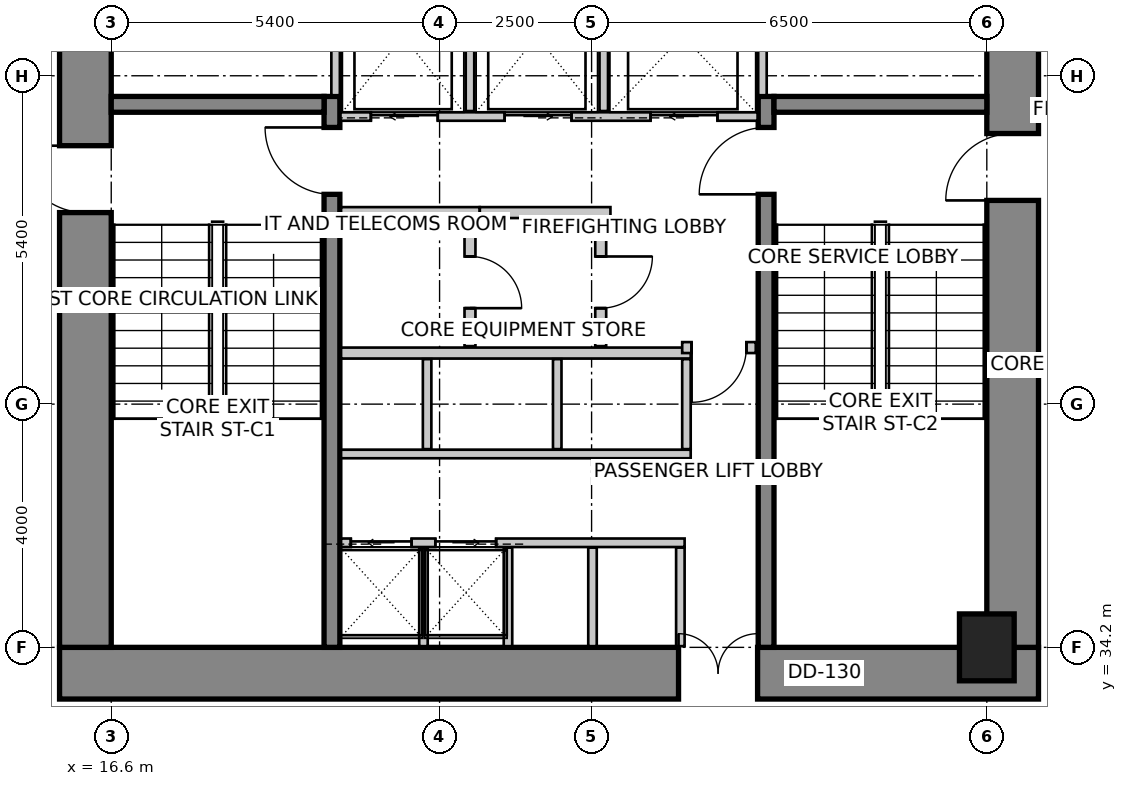
"""IFC4 building model, lengths in metres.
Left out: names, types, materials, properties, quantities, classifications, styles, units other than length and angle.
Written with IfcOpenShell. Run it as: python <this file> out.ifc"""

import sys

from ifc_helpers import new_model, si_unit, direction, frame, frame_2d, origin, origin_2d, place, context, subcontext, project, spatial, rectangle, extrude, source, transform, mapped, element, fill, save


model = new_model("IFC4")
c1 = context("Model", 3, precision=1e-05, world=origin(), true_north=direction((0.0, 1.0)))
c2 = subcontext(c1, "Body", "Model", "MODEL_VIEW")
j1 = project(units=[si_unit("LENGTHUNIT", "METRE"), si_unit("PLANEANGLEUNIT", "RADIAN")], contexts=[c1])
p1 = place(None, origin())
s1 = spatial("IfcSite", under=j1, at=p1, CompositionType="ELEMENT")
p2 = place(p1, origin())
s2 = spatial("IfcBuilding", under=s1, at=p2, CompositionType="ELEMENT")
p3 = place(p2, frame((0.0, 0.0, 71.0)))
s3 = spatial("IfcBuildingStorey", under=s2, at=p3, CompositionType="ELEMENT", Elevation=71.0)
p4 = place(p3, frame((15.75, 33.775, 0.0), z_axis=(0.0, 0.0, 1.0), x_axis=(1.0, 0.0, 0.0)))
e1 = element("IfcWall", 1, at=p4, inside=s3, PredefinedType="SHEAR", context=c2, shape_type="SweptSolid", body=[
    extrude(rectangle(XDim=16.1, YDim=0.85, at=frame_2d((8.05, 0.0))), origin(), (0.0, 0.0, 1.0), 4.0),
])
m1 = source(origin(), c2, "Body", "SweptSolid", [
    extrude(rectangle(XDim=1.3, YDim=2.15, at=frame_2d((0.65, 1.075))), frame((0.0, 0.435, 0.0), z_axis=(0.0, -1.0, 0.0), x_axis=(1.0, 0.0, 0.0)), (0.0, 0.0, 1.0), 0.87),
])
p5 = place(p4, frame((10.18, 0.0, 0.0)))
e2 = element("IfcOpeningElement", 2, at=p5, cuts=e1, PredefinedType="OPENING", context=c2, shape_type="MappedRepresentation", body=[
    mapped(m1, transform((0.0, 0.0, 0.0), scale=1.0)),
])
p6 = place(p3, frame((16.175, 34.2, 0.0), z_axis=(0.0, 0.0, 1.0), x_axis=(0.0, 1.0, 0.0)))
e3 = element("IfcWall", 3, at=p6, inside=s3, PredefinedType="SHEAR", context=c2, shape_type="SweptSolid", body=[
    extrude(rectangle(XDim=11.4, YDim=0.85, at=frame_2d((5.7, 0.0))), origin(), (0.0, 0.0, 1.0), 4.0),
])
m2 = source(origin(), c2, "Body", "SweptSolid", [
    extrude(rectangle(XDim=1.1, YDim=2.15, at=frame_2d((0.55, 1.075))), frame((0.0, 0.435, 0.0), z_axis=(0.0, -1.0, 0.0), x_axis=(1.0, 0.0, 0.0)), (0.0, 0.0, 1.0), 0.87),
])
p7 = place(p6, frame((7.15, 0.0, 0.0)))
e4 = element("IfcOpeningElement", 4, at=p7, cuts=e3, PredefinedType="OPENING", context=c2, shape_type="MappedRepresentation", body=[
    mapped(m2, transform((0.0, 0.0, 0.0), scale=1.0)),
])
p8 = place(p3, frame((31.425, 34.2, 0.0), z_axis=(0.0, 0.0, 1.0), x_axis=(0.0, 1.0, 0.0)))
e5 = element("IfcWall", 5, at=p8, inside=s3, PredefinedType="SHEAR", context=c2, shape_type="SweptSolid", body=[
    extrude(rectangle(XDim=11.4, YDim=0.85, at=frame_2d((5.7, 0.0))), origin(), (0.0, 0.0, 1.0), 4.0),
])
p9 = place(p8, frame((7.35, 0.0, 0.0)))
e6 = element("IfcOpeningElement", 6, at=p9, cuts=e5, PredefinedType="OPENING", context=c2, shape_type="MappedRepresentation", body=[
    mapped(m2, transform((0.0, 0.0, 0.0), scale=1.0)),
])
p10 = place(p3, frame((20.23, 34.2, 0.0), z_axis=(0.0, 0.0, 1.0), x_axis=(0.0, 1.0, 0.0)))
e7 = element("IfcWall", 7, at=p10, inside=s3, PredefinedType="SHEAR", context=c2, shape_type="SweptSolid", body=[
    extrude(rectangle(XDim=9.06, YDim=0.26, at=frame_2d((4.53, 0.0))), origin(), (0.0, 0.0, 1.0), 4.0),
])
m3 = source(origin(), c2, "Body", "SweptSolid", [
    extrude(rectangle(XDim=1.1, YDim=2.15, at=frame_2d((0.55, 1.075))), frame((0.0, 0.14, 0.0), z_axis=(0.0, -1.0, 0.0), x_axis=(1.0, 0.0, 0.0)), (0.0, 0.0, 1.0), 0.28),
])
p11 = place(p10, frame((7.45, 0.0, 0.0)))
e8 = element("IfcOpeningElement", 8, at=p11, cuts=e7, PredefinedType="OPENING", context=c2, shape_type="MappedRepresentation", body=[
    mapped(m3, transform((0.0, 0.0, 0.0), scale=1.0)),
])
p12 = place(p3, frame((27.37, 34.2, 0.0), z_axis=(0.0, 0.0, 1.0), x_axis=(0.0, 1.0, 0.0)))
e9 = element("IfcWall", 9, at=p12, inside=s3, PredefinedType="SHEAR", context=c2, shape_type="SweptSolid", body=[
    extrude(rectangle(XDim=9.06, YDim=0.26, at=frame_2d((4.53, 0.0))), origin(), (0.0, 0.0, 1.0), 4.0),
])
p13 = place(p12, frame((7.45, 0.0, 0.0)))
e10 = element("IfcOpeningElement", 10, at=p13, cuts=e9, PredefinedType="OPENING", context=c2, shape_type="MappedRepresentation", body=[
    mapped(m3, transform((0.0, 0.0, 0.0), scale=1.0)),
])
for number, where, z_axis, x_axis in (
    (11, (16.6, 43.13, 0.0), (0.0, 0.0, 1.0), (1.0, 0.0, 0.0)),
    (12, (27.5, 43.13, 0.0), (0.0, 0.0, 1.0), (1.0, 0.0, 0.0)),
):
    element("IfcWall", number, at=place(p3, frame(where, z_axis=z_axis, x_axis=x_axis)), inside=s3, PredefinedType="SHEAR", context=c2, shape_type="SweptSolid", body=[
        extrude(rectangle(XDim=3.5, YDim=0.26, at=frame_2d((1.75, 0.0))), origin(), (0.0, 0.0, 1.0), 4.0),
    ])
m4 = source(origin(), c2, "Body", "SweptSolid", [
    extrude(rectangle(XDim=0.9, YDim=1.1, at=origin_2d()), origin(), (0.0, 0.0, 1.0), 4.0),
])
p14 = place(p3, frame((31.0, 34.2, 0.0), z_axis=(0.0, 0.0, 1.0), x_axis=(1.0, 0.0, 0.0)))
e13 = element("IfcColumn", 13, at=p14, inside=s3, PredefinedType="COLUMN", context=c2, shape_type="MappedRepresentation", body=[
    mapped(m4, transform((0.0, 0.0, 0.0), scale=1.0)),
])
p15 = place(p3, frame((20.37, 42.93, 0.0), z_axis=(0.0, 0.0, 1.0), x_axis=(1.0, 0.0, 0.0)))
e14 = element("IfcWall", 14, at=p15, inside=s3, PredefinedType="SOLIDWALL", context=c2, shape_type="SweptSolid", body=[
    extrude(rectangle(XDim=6.86, YDim=0.14, at=frame_2d((3.43, 0.0))), origin(), (0.0, 0.0, 1.0), 3.75),
])
m5 = source(origin(), c2, "Body", "SweptSolid", [
    extrude(rectangle(XDim=1.1, YDim=2.15, at=frame_2d((0.55, 1.075))), frame((0.0, 0.08, 0.0), z_axis=(0.0, -1.0, 0.0), x_axis=(1.0, 0.0, 0.0)), (0.0, 0.0, 1.0), 0.16),
])
p16 = place(p15, frame((0.5, 0.0, 0.0)))
e15 = element("IfcOpeningElement", 15, at=p16, cuts=e14, PredefinedType="OPENING", context=c2, shape_type="MappedRepresentation", body=[
    mapped(m5, transform((0.0, 0.0, 0.0), scale=1.0)),
])
p17 = place(p15, frame((2.7, 0.0, 0.0)))
e16 = element("IfcOpeningElement", 16, at=p17, cuts=e14, PredefinedType="OPENING", context=c2, shape_type="MappedRepresentation", body=[
    mapped(m5, transform((0.0, 0.0, 0.0), scale=1.0)),
])
p18 = place(p15, frame((5.1, 0.0, 0.0)))
e17 = element("IfcOpeningElement", 17, at=p18, cuts=e14, PredefinedType="OPENING", context=c2, shape_type="MappedRepresentation", body=[
    mapped(m5, transform((0.0, 0.0, 0.0), scale=1.0)),
])
for number, where, z_axis, x_axis in (
    (18, (20.29, 43.28, 0.0), (0.0, 0.0, 1.0), (0.0, 1.0, 0.0)),
    (19, (27.31, 43.28, 0.0), (0.0, 0.0, 1.0), (0.0, 1.0, 0.0)),
):
    element("IfcWall", number, at=place(p3, frame(where, z_axis=z_axis, x_axis=x_axis)), inside=s3, PredefinedType="SOLIDWALL", context=c2, shape_type="SweptSolid", body=[
        extrude(rectangle(XDim=2.3, YDim=0.14, at=frame_2d((1.15, 0.0))), origin(), (0.0, 0.0, 1.0), 3.75),
    ])
for number, where, z_axis, x_axis in (
    (20, (22.5, 43.02, 0.0), (0.0, 0.0, 1.0), (0.0, 1.0, 0.0)),
    (21, (24.7, 43.02, 0.0), (0.0, 0.0, 1.0), (0.0, 1.0, 0.0)),
):
    element("IfcWall", number, at=place(p3, frame(where, z_axis=z_axis, x_axis=x_axis)), inside=s3, PredefinedType="SOLIDWALL", context=c2, shape_type="SweptSolid", body=[
        extrude(rectangle(XDim=2.56, YDim=0.14, at=frame_2d((1.28, 0.0))), origin(), (0.0, 0.0, 1.0), 3.75),
    ])
p19 = place(p3, frame((20.38, 35.92, 0.0), z_axis=(0.0, 0.0, 1.0), x_axis=(1.0, 0.0, 0.0)))
e22 = element("IfcWall", 22, at=p19, inside=s3, PredefinedType="SOLIDWALL", context=c2, shape_type="SweptSolid", body=[
    extrude(rectangle(XDim=5.65, YDim=0.14, at=frame_2d((2.825, 0.0))), origin(), (0.0, 0.0, 1.0), 3.75),
])
m6 = source(origin(), c2, "Body", "SweptSolid", [
    extrude(rectangle(XDim=1.0, YDim=2.15, at=frame_2d((0.5, 1.075))), frame((0.0, 0.08, 0.0), z_axis=(0.0, -1.0, 0.0), x_axis=(1.0, 0.0, 0.0)), (0.0, 0.0, 1.0), 0.16),
])
p20 = place(p19, frame((0.16, 0.0, 0.0)))
e23 = element("IfcOpeningElement", 23, at=p20, cuts=e22, PredefinedType="OPENING", context=c2, shape_type="MappedRepresentation", body=[
    mapped(m6, transform((0.0, 0.0, 0.0), scale=1.0)),
])
p21 = place(p19, frame((1.55, 0.0, 0.0)))
e24 = element("IfcOpeningElement", 24, at=p21, cuts=e22, PredefinedType="OPENING", context=c2, shape_type="MappedRepresentation", body=[
    mapped(m6, transform((0.0, 0.0, 0.0), scale=1.0)),
])
for number, where, z_axis, x_axis in (
    (25, (25.96, 34.22, 0.0), (0.0, 0.0, 1.0), (0.0, 1.0, 0.0)),
    (26, (21.735, 34.22, 0.0), (0.0, 0.0, 1.0), (0.0, 1.0, 0.0)),
    (27, (23.125, 34.22, 0.0), (0.0, 0.0, 1.0), (0.0, 1.0, 0.0)),
    (28, (24.515, 34.22, 0.0), (0.0, 0.0, 1.0), (0.0, 1.0, 0.0)),
):
    element("IfcWall", number, at=place(p3, frame(where, z_axis=z_axis, x_axis=x_axis)), inside=s3, PredefinedType="SOLIDWALL", context=c2, shape_type="SweptSolid", body=[
        extrude(rectangle(XDim=1.62, YDim=0.14, at=frame_2d((0.81, 0.0))), origin(), (0.0, 0.0, 1.0), 3.042),
    ])
p22 = place(p3, frame((20.38, 37.38, 0.0), z_axis=(0.0, 0.0, 1.0), x_axis=(1.0, 0.0, 0.0)))
e29 = element("IfcWall", 29, at=p22, inside=s3, PredefinedType="SOLIDWALL", context=c2, shape_type="SweptSolid", body=[
    extrude(rectangle(XDim=5.75, YDim=0.14, at=frame_2d((2.875, 0.0))), origin(), (0.0, 0.0, 1.0), 3.75),
])
p23 = place(p3, frame((20.38, 39.04, 0.0), z_axis=(0.0, 0.0, 1.0), x_axis=(1.0, 0.0, 0.0)))
e30 = element("IfcWall", 30, at=p23, inside=s3, PredefinedType="SOLIDWALL", context=c2, shape_type="SweptSolid", body=[
    extrude(rectangle(XDim=5.75, YDim=0.18, at=frame_2d((2.875, 0.0))), origin(), (0.0, 0.0, 1.0), 3.75),
])
for number, where, z_axis, x_axis in (
    (31, (26.06, 37.46, 0.0), (0.0, 0.0, 1.0), (0.0, 1.0, 0.0)),
    (32, (21.795, 37.46, 0.0), (0.0, 0.0, 1.0), (0.0, 1.0, 0.0)),
    (33, (23.935, 37.46, 0.0), (0.0, 0.0, 1.0), (0.0, 1.0, 0.0)),
):
    element("IfcWall", number, at=place(p3, frame(where, z_axis=z_axis, x_axis=x_axis)), inside=s3, PredefinedType="SOLIDWALL", context=c2, shape_type="SweptSolid", body=[
        extrude(rectangle(XDim=1.48, YDim=0.14, at=frame_2d((0.74, 0.0))), origin(), (0.0, 0.0, 1.0), 3.75),
    ])
p24 = place(p3, frame((22.66, 41.35, 0.0), z_axis=(0.0, 0.0, 1.0), x_axis=(-1.0, 0.0, 0.0)))
e34 = element("IfcWall", 34, at=p24, inside=s3, PredefinedType="PARTITIONING", context=c2, shape_type="SweptSolid", body=[
    extrude(rectangle(XDim=2.28, YDim=0.18, at=frame_2d((1.14, 0.0))), origin(), (0.0, 0.0, 1.0), 3.75),
])
p25 = place(p3, frame((24.81, 41.35, 0.0), z_axis=(0.0, 0.0, 1.0), x_axis=(-1.0, 0.0, 0.0)))
e35 = element("IfcWall", 35, at=p25, inside=s3, PredefinedType="PARTITIONING", context=c2, shape_type="SweptSolid", body=[
    extrude(rectangle(XDim=2.148, YDim=0.18, at=frame_2d((1.074, 0.0))), origin(), (0.0, 0.0, 1.0), 3.75),
])
p26 = place(p3, frame((22.5, 41.256, 0.0), z_axis=(0.0, 0.0, 1.0), x_axis=(0.0, -1.0, 0.0)))
e36 = element("IfcWall", 36, at=p26, inside=s3, PredefinedType="PARTITIONING", context=c2, shape_type="SweptSolid", body=[
    extrude(rectangle(XDim=2.106, YDim=0.18, at=frame_2d((1.053, 0.0))), origin(), (0.0, 0.0, 1.0), 3.75),
])
m7 = source(origin(), c2, "Body", "SweptSolid", [
    extrude(rectangle(XDim=0.85, YDim=2.15, at=frame_2d((0.425, 1.075))), frame((0.0, 0.1, 0.0), z_axis=(0.0, -1.0, 0.0), x_axis=(1.0, 0.0, 0.0)), (0.0, 0.0, 1.0), 0.2),
])
p27 = place(p26, frame((0.628, 0.0, 0.0)))
e37 = element("IfcOpeningElement", 37, at=p27, cuts=e36, PredefinedType="OPENING", context=c2, shape_type="MappedRepresentation", body=[
    mapped(m7, transform((0.0, 0.0, 0.0), scale=1.0)),
])
p28 = place(p3, frame((24.65, 41.256, 0.0), z_axis=(0.0, 0.0, 1.0), x_axis=(0.0, -1.0, 0.0)))
e38 = element("IfcWall", 38, at=p28, inside=s3, PredefinedType="PARTITIONING", context=c2, shape_type="SweptSolid", body=[
    extrude(rectangle(XDim=2.106, YDim=0.18, at=frame_2d((1.053, 0.0))), origin(), (0.0, 0.0, 1.0), 3.75),
])
p29 = place(p28, frame((0.628, 0.0, 0.0)))
e39 = element("IfcOpeningElement", 39, at=p29, cuts=e38, PredefinedType="OPENING", context=c2, shape_type="MappedRepresentation", body=[
    mapped(m7, transform((0.0, 0.0, 0.0), scale=1.0)),
])
p30 = place(p3, frame((27.2, 39.13, 0.0), z_axis=(0.0, 0.0, 1.0), x_axis=(-1.0, 0.0, 0.0)))
e40 = element("IfcWall", 40, at=p30, inside=s3, PredefinedType="PARTITIONING", context=c2, shape_type="SweptSolid", body=[
    extrude(rectangle(XDim=1.21, YDim=0.18, at=frame_2d((0.605, 0.0))), origin(), (0.0, 0.0, 1.0), 3.75),
])
m8 = source(origin(), c2, "Body", "SweptSolid", [
    extrude(rectangle(XDim=0.9, YDim=2.15, at=frame_2d((0.45, 1.075))), frame((0.0, 0.1, 0.0), z_axis=(0.0, -1.0, 0.0), x_axis=(1.0, 0.0, 0.0)), (0.0, 0.0, 1.0), 0.2),
])
p31 = place(p30, frame((0.155, 0.0, 0.0)))
e41 = element("IfcOpeningElement", 41, at=p31, cuts=e40, PredefinedType="OPENING", context=c2, shape_type="MappedRepresentation", body=[
    mapped(m8, transform((0.0, 0.0, 0.0), scale=1.0)),
])
m9 = source(origin(), c2, "Body", "SweptSolid", [
    extrude(rectangle(XDim=1.1, YDim=2.15, at=frame_2d((0.55, 1.075))), frame((0.0, 0.025, 0.0), z_axis=(0.0, -1.0, 0.0), x_axis=(1.0, 0.0, 0.0)), (0.0, 0.0, 1.0), 0.05),
])
p32 = place(p16, origin())
e42 = element("IfcDoor", 42, at=p32, inside=s3, OperationType="SLIDING_TO_LEFT", PredefinedType="DOOR", context=c2, shape_type="MappedRepresentation", body=[
    mapped(m9, transform((0.0, 0.0, 0.0), scale=1.0)),
])
fill(e15, e42)
p33 = place(p17, origin())
e43 = element("IfcDoor", 43, at=p33, inside=s3, OperationType="SLIDING_TO_RIGHT", PredefinedType="DOOR", context=c2, shape_type="MappedRepresentation", body=[
    mapped(m9, transform((0.0, 0.0, 0.0), scale=1.0)),
])
fill(e16, e43)
m10 = source(origin(), c2, "Body", "SweptSolid", [
    extrude(rectangle(XDim=1.1, YDim=2.15, at=frame_2d((0.55, 1.075))), frame((0.0, 0.025, 0.0), z_axis=(0.0, -1.0, 0.0), x_axis=(1.0, 0.0, 0.0)), (0.0, 0.0, 1.0), 0.05),
])
p34 = place(p18, origin())
e44 = element("IfcDoor", 44, at=p34, inside=s3, OperationType="SLIDING_TO_LEFT", PredefinedType="DOOR", context=c2, shape_type="MappedRepresentation", body=[
    mapped(m10, transform((0.0, 0.0, 0.0), scale=1.0)),
])
fill(e17, e44)
m11 = source(origin(), c2, "Body", "SweptSolid", [
    extrude(rectangle(XDim=1.0, YDim=2.15, at=frame_2d((0.5, 1.075))), frame((0.0, 0.025, 0.0), z_axis=(0.0, -1.0, 0.0), x_axis=(1.0, 0.0, 0.0)), (0.0, 0.0, 1.0), 0.05),
])
p35 = place(p20, origin())
e45 = element("IfcDoor", 45, at=p35, inside=s3, OperationType="SLIDING_TO_LEFT", PredefinedType="DOOR", context=c2, shape_type="MappedRepresentation", body=[
    mapped(m11, transform((0.0, 0.0, 0.0), scale=1.0)),
])
fill(e23, e45)
p36 = place(p21, origin())
e46 = element("IfcDoor", 46, at=p36, inside=s3, OperationType="SLIDING_TO_RIGHT", PredefinedType="DOOR", context=c2, shape_type="MappedRepresentation", body=[
    mapped(m11, transform((0.0, 0.0, 0.0), scale=1.0)),
])
fill(e24, e46)
m12 = source(origin(), c2, "Body", "SweptSolid", [
    extrude(rectangle(XDim=1.1, YDim=2.15, at=frame_2d((0.55, 1.075))), frame((0.0, 0.025, 0.0), z_axis=(0.0, -1.0, 0.0), x_axis=(1.0, 0.0, 0.0)), (0.0, 0.0, 1.0), 0.05),
])
p37 = place(p11, origin())
e47 = element("IfcDoor", 47, at=p37, inside=s3, OperationType="SINGLE_SWING_RIGHT", PredefinedType="DOOR", context=c2, shape_type="MappedRepresentation", body=[
    mapped(m12, transform((0.0, 0.0, 0.0), scale=1.0)),
])
fill(e8, e47)
p38 = place(p13, origin())
e48 = element("IfcDoor", 48, at=p38, inside=s3, OperationType="SINGLE_SWING_LEFT", PredefinedType="DOOR", context=c2, shape_type="MappedRepresentation", body=[
    mapped(m12, transform((0.0, 0.0, 0.0), scale=1.0)),
])
fill(e10, e48)
p39 = place(p7, origin())
e49 = element("IfcDoor", 49, at=p39, inside=s3, OperationType="SINGLE_SWING_RIGHT", PredefinedType="DOOR", context=c2, shape_type="MappedRepresentation", body=[
    mapped(m12, transform((0.0, 0.0, 0.0), scale=1.0)),
])
fill(e4, e49)
p40 = place(p9, origin())
e50 = element("IfcDoor", 50, at=p40, inside=s3, OperationType="SINGLE_SWING_LEFT", PredefinedType="DOOR", context=c2, shape_type="MappedRepresentation", body=[
    mapped(m12, transform((0.0, 0.0, 0.0), scale=1.0)),
])
fill(e6, e50)
m13 = source(origin(), c2, "Body", "SweptSolid", [
    extrude(rectangle(XDim=1.3, YDim=2.15, at=frame_2d((0.65, 1.075))), frame((0.0, 0.025, 0.0), z_axis=(0.0, -1.0, 0.0), x_axis=(1.0, 0.0, 0.0)), (0.0, 0.0, 1.0), 0.05),
])
p41 = place(p5, origin())
e51 = element("IfcDoor", 51, at=p41, inside=s3, OperationType="DOUBLE_DOOR_SINGLE_SWING", PredefinedType="DOOR", context=c2, shape_type="MappedRepresentation", body=[
    mapped(m13, transform((0.0, 0.0, 0.0), scale=1.0)),
])
fill(e2, e51)
m14 = source(origin(), c2, "Body", "SweptSolid", [
    extrude(rectangle(XDim=0.85, YDim=2.15, at=frame_2d((0.425, 1.075))), frame((0.0, 0.025, 0.0), z_axis=(0.0, -1.0, 0.0), x_axis=(1.0, 0.0, 0.0)), (0.0, 0.0, 1.0), 0.05),
])
p42 = place(p27, origin())
e52 = element("IfcDoor", 52, at=p42, inside=s3, OperationType="SINGLE_SWING_RIGHT", PredefinedType="DOOR", context=c2, shape_type="MappedRepresentation", body=[
    mapped(m14, transform((0.0, 0.0, 0.0), scale=1.0)),
])
fill(e37, e52)
p43 = place(p29, origin())
e53 = element("IfcDoor", 53, at=p43, inside=s3, OperationType="SINGLE_SWING_LEFT", PredefinedType="DOOR", context=c2, shape_type="MappedRepresentation", body=[
    mapped(m14, transform((0.0, 0.0, 0.0), scale=1.0)),
])
fill(e39, e53)
m15 = source(origin(), c2, "Body", "SweptSolid", [
    extrude(rectangle(XDim=0.9, YDim=2.15, at=frame_2d((0.45, 1.075))), frame((0.0, 0.025, 0.0), z_axis=(0.0, -1.0, 0.0), x_axis=(1.0, 0.0, 0.0)), (0.0, 0.0, 1.0), 0.05),
])
p44 = place(p31, origin())
e54 = element("IfcDoor", 54, at=p44, inside=s3, OperationType="SINGLE_SWING_RIGHT", PredefinedType="DOOR", context=c2, shape_type="MappedRepresentation", body=[
    mapped(m15, transform((0.0, 0.0, 0.0), scale=1.0)),
])
fill(e41, e54)
save(model, sys.argv[1])
